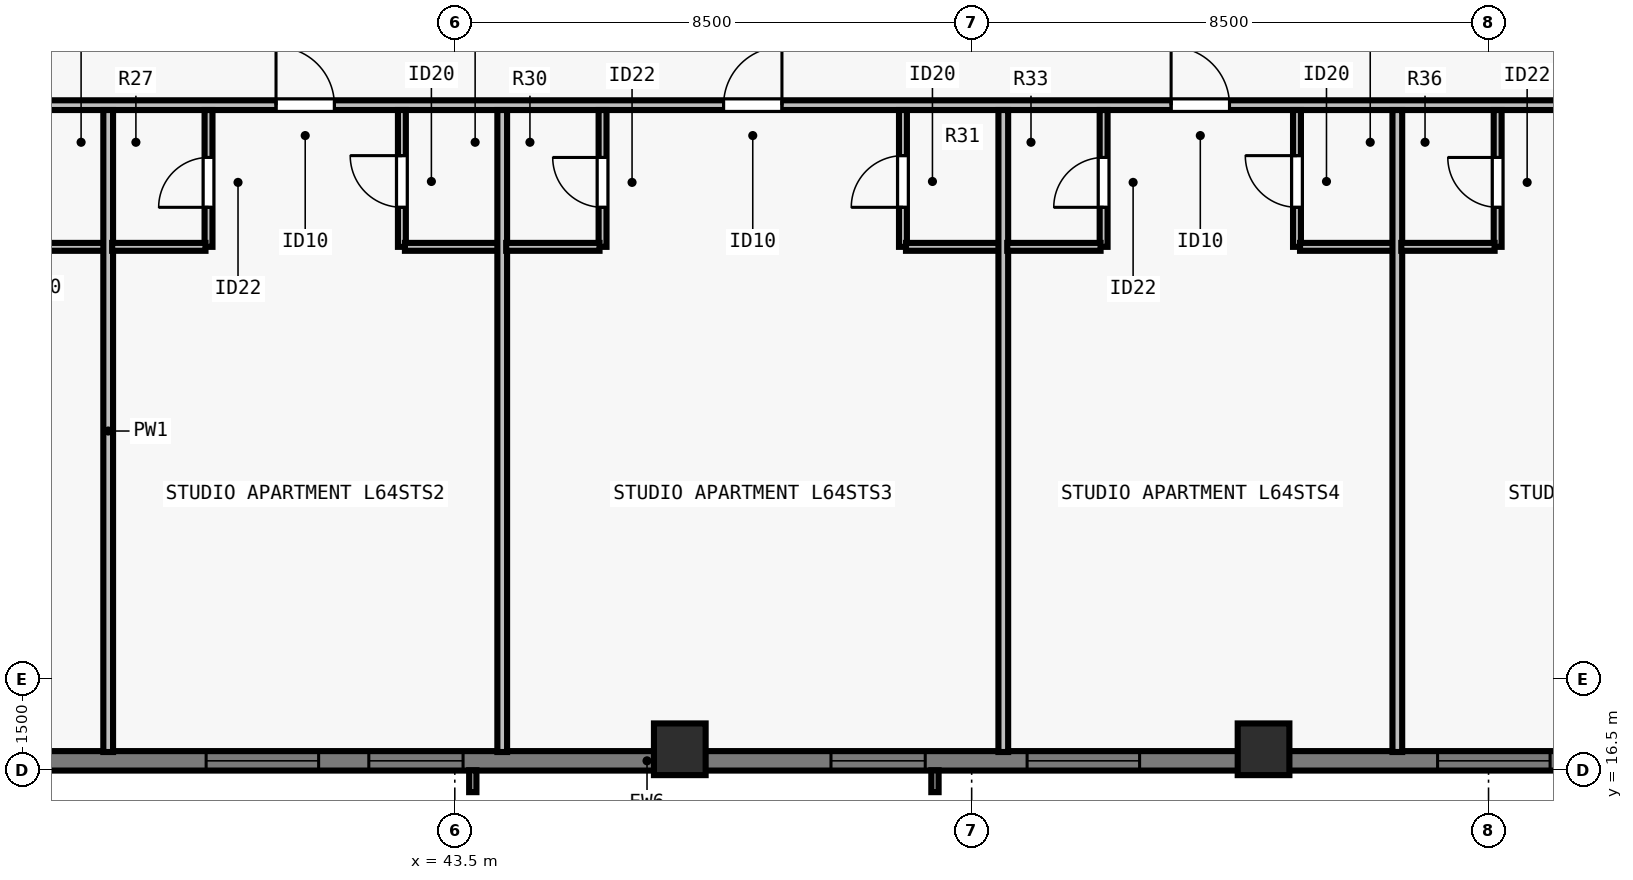
"""IFC4 building model, lengths in metres.
Left out: names, types, materials, properties, quantities, classifications, styles, units other than length and angle.
Written with IfcOpenShell. Run it as: python <this file> out.ifc"""

import sys

from ifc_helpers import new_model, si_unit, direction, frame, frame_2d, origin, origin_2d, place, context, subcontext, project, spatial, rectangle, extrude, element, fill, save


model = new_model("IFC4")
c1 = context("Model", 3, precision=1e-05, world=origin(), true_north=direction((0.0, 1.0)))
c2 = subcontext(c1, "Body", "Model", "MODEL_VIEW")
j1 = project(units=[si_unit("LENGTHUNIT", "METRE"), si_unit("PLANEANGLEUNIT", "RADIAN")], contexts=[c1])
p1 = place(None, origin())
s1 = spatial("IfcSite", under=j1, at=p1, CompositionType="ELEMENT")
p2 = place(p1, origin())
s2 = spatial("IfcBuilding", under=s1, at=p2, CompositionType="ELEMENT")
p3 = place(p2, frame((0.0, 0.0, 234.0)))
s3 = spatial("IfcBuildingStorey", under=s2, at=p3, CompositionType="ELEMENT", Elevation=234.0)
for number, where, z_axis, x_axis in (
    (1, (47.2, 16.85, 0.0), (0.0, 0.0, 1.0), (1.0, 0.0, 0.0)),
    (2, (56.8, 16.85, 0.0), (0.0, 0.0, 1.0), (1.0, 0.0, 0.0)),
):
    element("IfcColumn", number, at=place(p3, frame(where, z_axis=z_axis, x_axis=x_axis)), inside=s3, PredefinedType="COLUMN", context=c2, shape_type="SweptSolid", body=[
        extrude(rectangle(XDim=0.85, YDim=0.85, at=origin_2d()), origin(), (0.0, 0.0, 1.0), 3.5),
    ])
p4 = place(p3, frame((69.5, 16.66, 0.0), z_axis=(0.0, 0.0, 1.0), x_axis=(-1.0, 0.0, 0.0)))
e3 = element("IfcWall", 3, at=p4, inside=s3, PredefinedType="SOLIDWALL", context=c2, shape_type="SweptSolid", body=[
    extrude(rectangle(XDim=34.702, YDim=0.32, at=frame_2d((17.351, 0.0))), origin(), (0.0, 0.0, 1.0), 3.29),
])
p5 = place(p4, frame((4.763, 0.0, 0.8)))
e4 = element("IfcOpeningElement", 4, at=p5, cuts=e3, PredefinedType="OPENING", context=c2, shape_type="SweptSolid", body=[
    extrude(rectangle(XDim=1.55, YDim=1.678, at=frame_2d((0.775, 0.839))), frame((0.0, 0.17, 0.0), z_axis=(0.0, -1.0, 0.0), x_axis=(1.0, 0.0, 0.0)), (0.0, 0.0, 1.0), 0.34),
])
p6 = place(p4, frame((7.988, 0.0, 0.8)))
e5 = element("IfcOpeningElement", 5, at=p6, cuts=e3, PredefinedType="OPENING", context=c2, shape_type="SweptSolid", body=[
    extrude(rectangle(XDim=1.85, YDim=1.678, at=frame_2d((0.925, 0.839))), frame((0.0, 0.17, 0.0), z_axis=(0.0, -1.0, 0.0), x_axis=(1.0, 0.0, 0.0)), (0.0, 0.0, 1.0), 0.34),
])
p7 = place(p4, frame((14.738, 0.0, 0.8)))
e6 = element("IfcOpeningElement", 6, at=p7, cuts=e3, PredefinedType="OPENING", context=c2, shape_type="SweptSolid", body=[
    extrude(rectangle(XDim=1.85, YDim=1.678, at=frame_2d((0.925, 0.839))), frame((0.0, 0.17, 0.0), z_axis=(0.0, -1.0, 0.0), x_axis=(1.0, 0.0, 0.0)), (0.0, 0.0, 1.0), 0.34),
])
p8 = place(p4, frame((18.264, 0.0, 0.8)))
e7 = element("IfcOpeningElement", 7, at=p8, cuts=e3, PredefinedType="OPENING", context=c2, shape_type="SweptSolid", body=[
    extrude(rectangle(XDim=1.55, YDim=1.678, at=frame_2d((0.775, 0.839))), frame((0.0, 0.17, 0.0), z_axis=(0.0, -1.0, 0.0), x_axis=(1.0, 0.0, 0.0)), (0.0, 0.0, 1.0), 0.34),
])
p9 = place(p4, frame((25.864, 0.0, 0.8)))
e8 = element("IfcOpeningElement", 8, at=p9, cuts=e3, PredefinedType="OPENING", context=c2, shape_type="SweptSolid", body=[
    extrude(rectangle(XDim=1.55, YDim=1.678, at=frame_2d((0.775, 0.839))), frame((0.0, 0.17, 0.0), z_axis=(0.0, -1.0, 0.0), x_axis=(1.0, 0.0, 0.0)), (0.0, 0.0, 1.0), 0.34),
])
p10 = place(p4, frame((28.24, 0.0, 0.8)))
e9 = element("IfcOpeningElement", 9, at=p10, cuts=e3, PredefinedType="OPENING", context=c2, shape_type="SweptSolid", body=[
    extrude(rectangle(XDim=1.85, YDim=1.678, at=frame_2d((0.925, 0.839))), frame((0.0, 0.17, 0.0), z_axis=(0.0, -1.0, 0.0), x_axis=(1.0, 0.0, 0.0)), (0.0, 0.0, 1.0), 0.34),
])
p11 = place(p3, frame((29.805, 27.442, 0.0), z_axis=(0.0, 0.0, 1.0), x_axis=(1.0, 0.0, 0.0)))
e10 = element("IfcWall", 10, at=p11, inside=s3, PredefinedType="PARTITIONING", context=c2, shape_type="SweptSolid", body=[
    extrude(rectangle(XDim=44.39, YDim=0.16, at=frame_2d((22.195, 0.0))), origin(), (0.0, 0.0, 1.0), 2.958),
])
p12 = place(p11, frame((3.575, 0.0, 0.0)))
e11 = element("IfcOpeningElement", 11, at=p12, cuts=e10, PredefinedType="OPENING", context=c2, shape_type="SweptSolid", body=[
    extrude(rectangle(XDim=0.96, YDim=2.18, at=frame_2d((0.48, 1.09))), frame((0.0, 0.09, 0.0), z_axis=(0.0, -1.0, 0.0), x_axis=(1.0, 0.0, 0.0)), (0.0, 0.0, 1.0), 0.18),
])
p13 = place(p11, frame((10.755, 0.0, 0.0)))
e12 = element("IfcOpeningElement", 12, at=p13, cuts=e10, PredefinedType="OPENING", context=c2, shape_type="SweptSolid", body=[
    extrude(rectangle(XDim=0.96, YDim=2.18, at=frame_2d((0.48, 1.09))), frame((0.0, 0.09, 0.0), z_axis=(0.0, -1.0, 0.0), x_axis=(1.0, 0.0, 0.0)), (0.0, 0.0, 1.0), 0.18),
])
p14 = place(p11, frame((18.115, 0.0, 0.0)))
e13 = element("IfcOpeningElement", 13, at=p14, cuts=e10, PredefinedType="OPENING", context=c2, shape_type="SweptSolid", body=[
    extrude(rectangle(XDim=0.96, YDim=2.18, at=frame_2d((0.48, 1.09))), frame((0.0, 0.09, 0.0), z_axis=(0.0, -1.0, 0.0), x_axis=(1.0, 0.0, 0.0)), (0.0, 0.0, 1.0), 0.18),
])
p15 = place(p11, frame((25.475, 0.0, 0.0)))
e14 = element("IfcOpeningElement", 14, at=p15, cuts=e10, PredefinedType="OPENING", context=c2, shape_type="SweptSolid", body=[
    extrude(rectangle(XDim=0.96, YDim=2.18, at=frame_2d((0.48, 1.09))), frame((0.0, 0.09, 0.0), z_axis=(0.0, -1.0, 0.0), x_axis=(1.0, 0.0, 0.0)), (0.0, 0.0, 1.0), 0.18),
])
p16 = place(p11, frame((32.835, 0.0, 0.0)))
e15 = element("IfcOpeningElement", 15, at=p16, cuts=e10, PredefinedType="OPENING", context=c2, shape_type="SweptSolid", body=[
    extrude(rectangle(XDim=0.96, YDim=2.18, at=frame_2d((0.48, 1.09))), frame((0.0, 0.09, 0.0), z_axis=(0.0, -1.0, 0.0), x_axis=(1.0, 0.0, 0.0)), (0.0, 0.0, 1.0), 0.18),
])
p17 = place(p11, frame((40.375, 0.0, 0.0)))
e16 = element("IfcOpeningElement", 16, at=p17, cuts=e10, PredefinedType="OPENING", context=c2, shape_type="SweptSolid", body=[
    extrude(rectangle(XDim=0.96, YDim=2.18, at=frame_2d((0.48, 1.09))), frame((0.0, 0.09, 0.0), z_axis=(0.0, -1.0, 0.0), x_axis=(1.0, 0.0, 0.0)), (0.0, 0.0, 1.0), 0.18),
])
p18 = place(p3, frame((36.2, 25.113, 0.0), z_axis=(0.0, 0.0, 1.0), x_axis=(1.0, 0.0, 0.0)))
e17 = element("IfcWall", 17, at=p18, inside=s3, PredefinedType="PLUMBINGWALL", context=c2, shape_type="SweptSolid", body=[
    extrude(rectangle(XDim=1.6, YDim=0.13, at=frame_2d((0.8, 0.0))), origin(), (0.0, 0.0, 1.0), 3.29),
])
p19 = place(p3, frame((37.8, 16.805, 0.0), z_axis=(0.0, 0.0, 1.0), x_axis=(0.0, 1.0, 0.0)))
e18 = element("IfcWall", 18, at=p19, inside=s3, PredefinedType="PARTITIONING", context=c2, shape_type="SweptSolid", body=[
    extrude(rectangle(XDim=10.558, YDim=0.16, at=frame_2d((5.279, 0.0))), origin(), (0.0, 0.0, 1.0), 2.573),
])
p20 = place(p3, frame((39.45, 25.113, 0.0), z_axis=(0.0, 0.0, 1.0), x_axis=(0.0, 1.0, 0.0)))
e19 = element("IfcWall", 19, at=p20, inside=s3, PredefinedType="PLUMBINGWALL", context=c2, shape_type="SweptSolid", body=[
    extrude(rectangle(XDim=2.25, YDim=0.13, at=frame_2d((1.125, 0.0))), origin(), (0.0, 0.0, 1.0), 3.29),
])
p21 = place(p20, frame((0.65, 0.0, 0.0)))
e20 = element("IfcOpeningElement", 20, at=p21, cuts=e19, PredefinedType="OPENING", context=c2, shape_type="SweptSolid", body=[
    extrude(rectangle(XDim=0.82, YDim=2.1, at=frame_2d((0.41, 1.05))), frame((0.0, 0.075, 0.0), z_axis=(0.0, -1.0, 0.0), x_axis=(1.0, 0.0, 0.0)), (0.0, 0.0, 1.0), 0.15),
])
p22 = place(p3, frame((37.865, 25.113, 0.0), z_axis=(0.0, 0.0, 1.0), x_axis=(1.0, 0.0, 0.0)))
e21 = element("IfcWall", 21, at=p22, inside=s3, PredefinedType="PLUMBINGWALL", context=c2, shape_type="SweptSolid", body=[
    extrude(rectangle(XDim=1.535, YDim=0.13, at=frame_2d((0.768, 0.0))), origin(), (0.0, 0.0, 1.0), 3.29),
])
p23 = place(p3, frame((42.63, 25.113, 0.0), z_axis=(0.0, 0.0, 1.0), x_axis=(0.0, 1.0, 0.0)))
e22 = element("IfcWall", 22, at=p23, inside=s3, PredefinedType="PLUMBINGWALL", context=c2, shape_type="SweptSolid", body=[
    extrude(rectangle(XDim=2.25, YDim=0.13, at=frame_2d((1.125, 0.0))), origin(), (0.0, 0.0, 1.0), 3.29),
])
p24 = place(p23, frame((0.65, 0.0, 0.0)))
e23 = element("IfcOpeningElement", 23, at=p24, cuts=e22, PredefinedType="OPENING", context=c2, shape_type="SweptSolid", body=[
    extrude(rectangle(XDim=0.85, YDim=2.1, at=frame_2d((0.425, 1.05))), frame((0.0, 0.075, 0.0), z_axis=(0.0, -1.0, 0.0), x_axis=(1.0, 0.0, 0.0)), (0.0, 0.0, 1.0), 0.15),
])
p25 = place(p3, frame((42.68, 25.113, 0.0), z_axis=(0.0, 0.0, 1.0), x_axis=(1.0, 0.0, 0.0)))
e24 = element("IfcWall", 24, at=p25, inside=s3, PredefinedType="PLUMBINGWALL", context=c2, shape_type="SweptSolid", body=[
    extrude(rectangle(XDim=1.6, YDim=0.13, at=frame_2d((0.8, 0.0))), origin(), (0.0, 0.0, 1.0), 3.29),
])
p26 = place(p3, frame((44.28, 16.805, 0.0), z_axis=(0.0, 0.0, 1.0), x_axis=(0.0, 1.0, 0.0)))
e25 = element("IfcWall", 25, at=p26, inside=s3, PredefinedType="PARTITIONING", context=c2, shape_type="SweptSolid", body=[
    extrude(rectangle(XDim=10.558, YDim=0.16, at=frame_2d((5.279, 0.0))), origin(), (0.0, 0.0, 1.0), 3.29),
])
p27 = place(p3, frame((45.93, 25.113, 0.0), z_axis=(0.0, 0.0, 1.0), x_axis=(0.0, 1.0, 0.0)))
e26 = element("IfcWall", 26, at=p27, inside=s3, PredefinedType="PLUMBINGWALL", context=c2, shape_type="SweptSolid", body=[
    extrude(rectangle(XDim=2.25, YDim=0.13, at=frame_2d((1.125, 0.0))), origin(), (0.0, 0.0, 1.0), 3.29),
])
p28 = place(p27, frame((0.65, 0.0, 0.0)))
e27 = element("IfcOpeningElement", 27, at=p28, cuts=e26, PredefinedType="OPENING", context=c2, shape_type="SweptSolid", body=[
    extrude(rectangle(XDim=0.82, YDim=2.1, at=frame_2d((0.41, 1.05))), frame((0.0, 0.075, 0.0), z_axis=(0.0, -1.0, 0.0), x_axis=(1.0, 0.0, 0.0)), (0.0, 0.0, 1.0), 0.15),
])
p29 = place(p3, frame((44.345, 25.113, 0.0), z_axis=(0.0, 0.0, 1.0), x_axis=(1.0, 0.0, 0.0)))
e28 = element("IfcWall", 28, at=p29, inside=s3, PredefinedType="PLUMBINGWALL", context=c2, shape_type="SweptSolid", body=[
    extrude(rectangle(XDim=1.535, YDim=0.13, at=frame_2d((0.768, 0.0))), origin(), (0.0, 0.0, 1.0), 3.29),
])
p30 = place(p3, frame((50.87, 25.113, 0.0), z_axis=(0.0, 0.0, 1.0), x_axis=(0.0, 1.0, 0.0)))
e29 = element("IfcWall", 29, at=p30, inside=s3, PredefinedType="PLUMBINGWALL", context=c2, shape_type="SweptSolid", body=[
    extrude(rectangle(XDim=2.25, YDim=0.13, at=frame_2d((1.125, 0.0))), origin(), (0.0, 0.0, 1.0), 3.29),
])
p31 = place(p30, frame((0.65, 0.0, 0.0)))
e30 = element("IfcOpeningElement", 30, at=p31, cuts=e29, PredefinedType="OPENING", context=c2, shape_type="SweptSolid", body=[
    extrude(rectangle(XDim=0.85, YDim=2.1, at=frame_2d((0.425, 1.05))), frame((0.0, 0.075, 0.0), z_axis=(0.0, -1.0, 0.0), x_axis=(1.0, 0.0, 0.0)), (0.0, 0.0, 1.0), 0.15),
])
p32 = place(p3, frame((50.92, 25.113, 0.0), z_axis=(0.0, 0.0, 1.0), x_axis=(1.0, 0.0, 0.0)))
e31 = element("IfcWall", 31, at=p32, inside=s3, PredefinedType="PLUMBINGWALL", context=c2, shape_type="SweptSolid", body=[
    extrude(rectangle(XDim=1.6, YDim=0.13, at=frame_2d((0.8, 0.0))), origin(), (0.0, 0.0, 1.0), 3.29),
])
p33 = place(p3, frame((52.52, 16.805, 0.0), z_axis=(0.0, 0.0, 1.0), x_axis=(0.0, 1.0, 0.0)))
e32 = element("IfcWall", 32, at=p33, inside=s3, PredefinedType="PARTITIONING", context=c2, shape_type="SweptSolid", body=[
    extrude(rectangle(XDim=10.558, YDim=0.16, at=frame_2d((5.279, 0.0))), origin(), (0.0, 0.0, 1.0), 2.958),
])
p34 = place(p3, frame((54.17, 25.113, 0.0), z_axis=(0.0, 0.0, 1.0), x_axis=(0.0, 1.0, 0.0)))
e33 = element("IfcWall", 33, at=p34, inside=s3, PredefinedType="PLUMBINGWALL", context=c2, shape_type="SweptSolid", body=[
    extrude(rectangle(XDim=2.25, YDim=0.13, at=frame_2d((1.125, 0.0))), origin(), (0.0, 0.0, 1.0), 2.958),
])
p35 = place(p34, frame((0.65, 0.0, 0.0)))
e34 = element("IfcOpeningElement", 34, at=p35, cuts=e33, PredefinedType="OPENING", context=c2, shape_type="SweptSolid", body=[
    extrude(rectangle(XDim=0.82, YDim=2.1, at=frame_2d((0.41, 1.05))), frame((0.0, 0.075, 0.0), z_axis=(0.0, -1.0, 0.0), x_axis=(1.0, 0.0, 0.0)), (0.0, 0.0, 1.0), 0.15),
])
p36 = place(p3, frame((52.585, 25.113, 0.0), z_axis=(0.0, 0.0, 1.0), x_axis=(1.0, 0.0, 0.0)))
e35 = element("IfcWall", 35, at=p36, inside=s3, PredefinedType="PLUMBINGWALL", context=c2, shape_type="SweptSolid", body=[
    extrude(rectangle(XDim=1.535, YDim=0.13, at=frame_2d((0.768, 0.0))), origin(), (0.0, 0.0, 1.0), 3.29),
])
p37 = place(p3, frame((57.35, 25.113, 0.0), z_axis=(0.0, 0.0, 1.0), x_axis=(0.0, 1.0, 0.0)))
e36 = element("IfcWall", 36, at=p37, inside=s3, PredefinedType="PLUMBINGWALL", context=c2, shape_type="SweptSolid", body=[
    extrude(rectangle(XDim=2.25, YDim=0.13, at=frame_2d((1.125, 0.0))), origin(), (0.0, 0.0, 1.0), 3.29),
])
p38 = place(p37, frame((0.65, 0.0, 0.0)))
e37 = element("IfcOpeningElement", 37, at=p38, cuts=e36, PredefinedType="OPENING", context=c2, shape_type="SweptSolid", body=[
    extrude(rectangle(XDim=0.85, YDim=2.1, at=frame_2d((0.425, 1.05))), frame((0.0, 0.075, 0.0), z_axis=(0.0, -1.0, 0.0), x_axis=(1.0, 0.0, 0.0)), (0.0, 0.0, 1.0), 0.15),
])
p39 = place(p3, frame((57.4, 25.113, 0.0), z_axis=(0.0, 0.0, 1.0), x_axis=(1.0, 0.0, 0.0)))
e38 = element("IfcWall", 38, at=p39, inside=s3, PredefinedType="PLUMBINGWALL", context=c2, shape_type="SweptSolid", body=[
    extrude(rectangle(XDim=1.6, YDim=0.13, at=frame_2d((0.8, 0.0))), origin(), (0.0, 0.0, 1.0), 3.29),
])
p40 = place(p3, frame((59.0, 16.805, 0.0), z_axis=(0.0, 0.0, 1.0), x_axis=(0.0, 1.0, 0.0)))
e39 = element("IfcWall", 39, at=p40, inside=s3, PredefinedType="PARTITIONING", context=c2, shape_type="SweptSolid", body=[
    extrude(rectangle(XDim=10.558, YDim=0.16, at=frame_2d((5.279, 0.0))), origin(), (0.0, 0.0, 1.0), 3.29),
])
p41 = place(p3, frame((60.65, 25.113, 0.0), z_axis=(0.0, 0.0, 1.0), x_axis=(0.0, 1.0, 0.0)))
e40 = element("IfcWall", 40, at=p41, inside=s3, PredefinedType="PLUMBINGWALL", context=c2, shape_type="SweptSolid", body=[
    extrude(rectangle(XDim=2.25, YDim=0.13, at=frame_2d((1.125, 0.0))), origin(), (0.0, 0.0, 1.0), 3.29),
])
p42 = place(p41, frame((0.65, 0.0, 0.0)))
e41 = element("IfcOpeningElement", 41, at=p42, cuts=e40, PredefinedType="OPENING", context=c2, shape_type="SweptSolid", body=[
    extrude(rectangle(XDim=0.82, YDim=2.1, at=frame_2d((0.41, 1.05))), frame((0.0, 0.075, 0.0), z_axis=(0.0, -1.0, 0.0), x_axis=(1.0, 0.0, 0.0)), (0.0, 0.0, 1.0), 0.15),
])
p43 = place(p3, frame((59.065, 25.113, 0.0), z_axis=(0.0, 0.0, 1.0), x_axis=(1.0, 0.0, 0.0)))
e42 = element("IfcWall", 42, at=p43, inside=s3, PredefinedType="PLUMBINGWALL", context=c2, shape_type="SweptSolid", body=[
    extrude(rectangle(XDim=1.535, YDim=0.13, at=frame_2d((0.768, 0.0))), origin(), (0.0, 0.0, 1.0), 3.29),
])
p44 = place(p6, origin())
e43 = element("IfcWindow", 43, at=p44, inside=s3, PartitioningType="SINGLE_PANEL", PredefinedType="WINDOW", context=c2, shape_type="SweptSolid", body=[
    extrude(rectangle(XDim=1.85, YDim=1.678, at=frame_2d((0.925, 0.839))), frame((0.0, -0.05, 0.0), z_axis=(0.0, -1.0, 0.0), x_axis=(1.0, 0.0, 0.0)), (0.0, 0.0, 1.0), 0.06),
])
fill(e5, e43)
p45 = place(p7, origin())
e44 = element("IfcWindow", 44, at=p45, inside=s3, PartitioningType="SINGLE_PANEL", PredefinedType="WINDOW", context=c2, shape_type="SweptSolid", body=[
    extrude(rectangle(XDim=1.85, YDim=1.678, at=frame_2d((0.925, 0.839))), frame((0.0, -0.05, 0.0), z_axis=(0.0, -1.0, 0.0), x_axis=(1.0, 0.0, 0.0)), (0.0, 0.0, 1.0), 0.06),
])
fill(e6, e44)
p46 = place(p8, origin())
e45 = element("IfcWindow", 45, at=p46, inside=s3, PartitioningType="SINGLE_PANEL", PredefinedType="WINDOW", context=c2, shape_type="SweptSolid", body=[
    extrude(rectangle(XDim=1.55, YDim=1.678, at=frame_2d((0.775, 0.839))), frame((0.0, -0.05, 0.0), z_axis=(0.0, -1.0, 0.0), x_axis=(1.0, 0.0, 0.0)), (0.0, 0.0, 1.0), 0.06),
])
fill(e7, e45)
p47 = place(p9, origin())
e46 = element("IfcWindow", 46, at=p47, inside=s3, PartitioningType="SINGLE_PANEL", PredefinedType="WINDOW", context=c2, shape_type="SweptSolid", body=[
    extrude(rectangle(XDim=1.55, YDim=1.678, at=frame_2d((0.775, 0.839))), frame((0.0, -0.05, 0.0), z_axis=(0.0, -1.0, 0.0), x_axis=(1.0, 0.0, 0.0)), (0.0, 0.0, 1.0), 0.06),
])
fill(e8, e46)
p48 = place(p10, origin())
e47 = element("IfcWindow", 47, at=p48, inside=s3, PartitioningType="SINGLE_PANEL", PredefinedType="WINDOW", context=c2, shape_type="SweptSolid", body=[
    extrude(rectangle(XDim=1.85, YDim=1.678, at=frame_2d((0.925, 0.839))), frame((0.0, -0.05, 0.0), z_axis=(0.0, -1.0, 0.0), x_axis=(1.0, 0.0, 0.0)), (0.0, 0.0, 1.0), 0.06),
])
fill(e9, e47)
p49 = place(p21, origin())
e48 = element("IfcDoor", 48, at=p49, inside=s3, OperationType="SINGLE_SWING_LEFT", PredefinedType="DOOR", context=c2, shape_type="SweptSolid", body=[
    extrude(rectangle(XDim=0.82, YDim=2.1, at=frame_2d((0.41, 1.05))), frame((0.0, 0.025, 0.0), z_axis=(0.0, -1.0, 0.0), x_axis=(1.0, 0.0, 0.0)), (0.0, 0.0, 1.0), 0.05),
])
fill(e20, e48)
p50 = place(p24, origin())
e49 = element("IfcDoor", 49, at=p50, inside=s3, OperationType="SINGLE_SWING_RIGHT", PredefinedType="DOOR", context=c2, shape_type="SweptSolid", body=[
    extrude(rectangle(XDim=0.85, YDim=2.1, at=frame_2d((0.425, 1.05))), frame((0.0, 0.025, 0.0), z_axis=(0.0, -1.0, 0.0), x_axis=(1.0, 0.0, 0.0)), (0.0, 0.0, 1.0), 0.05),
])
fill(e23, e49)
p51 = place(p13, origin())
e50 = element("IfcDoor", 50, at=p51, inside=s3, OperationType="SINGLE_SWING_LEFT", PredefinedType="DOOR", context=c2, shape_type="SweptSolid", body=[
    extrude(rectangle(XDim=0.96, YDim=2.18, at=frame_2d((0.48, 1.09))), frame((0.0, 0.025, 0.0), z_axis=(0.0, -1.0, 0.0), x_axis=(1.0, 0.0, 0.0)), (0.0, 0.0, 1.0), 0.05),
])
fill(e12, e50)
p52 = place(p28, origin())
e51 = element("IfcDoor", 51, at=p52, inside=s3, OperationType="SINGLE_SWING_RIGHT", PredefinedType="DOOR", context=c2, shape_type="SweptSolid", body=[
    extrude(rectangle(XDim=0.82, YDim=2.1, at=frame_2d((0.41, 1.05))), frame((0.0, 0.025, 0.0), z_axis=(0.0, -1.0, 0.0), x_axis=(1.0, 0.0, 0.0)), (0.0, 0.0, 1.0), 0.05),
])
fill(e27, e51)
p53 = place(p31, origin())
e52 = element("IfcDoor", 52, at=p53, inside=s3, OperationType="SINGLE_SWING_LEFT", PredefinedType="DOOR", context=c2, shape_type="SweptSolid", body=[
    extrude(rectangle(XDim=0.85, YDim=2.1, at=frame_2d((0.425, 1.05))), frame((0.0, 0.025, 0.0), z_axis=(0.0, -1.0, 0.0), x_axis=(1.0, 0.0, 0.0)), (0.0, 0.0, 1.0), 0.05),
])
fill(e30, e52)
p54 = place(p14, origin())
e53 = element("IfcDoor", 53, at=p54, inside=s3, OperationType="SINGLE_SWING_RIGHT", PredefinedType="DOOR", context=c2, shape_type="SweptSolid", body=[
    extrude(rectangle(XDim=0.96, YDim=2.18, at=frame_2d((0.48, 1.09))), frame((0.0, 0.025, 0.0), z_axis=(0.0, -1.0, 0.0), x_axis=(1.0, 0.0, 0.0)), (0.0, 0.0, 1.0), 0.05),
])
fill(e13, e53)
p55 = place(p35, origin())
e54 = element("IfcDoor", 54, at=p55, inside=s3, OperationType="SINGLE_SWING_LEFT", PredefinedType="DOOR", context=c2, shape_type="SweptSolid", body=[
    extrude(rectangle(XDim=0.82, YDim=2.1, at=frame_2d((0.41, 1.05))), frame((0.0, 0.025, 0.0), z_axis=(0.0, -1.0, 0.0), x_axis=(1.0, 0.0, 0.0)), (0.0, 0.0, 1.0), 0.05),
])
fill(e34, e54)
p56 = place(p38, origin())
e55 = element("IfcDoor", 55, at=p56, inside=s3, OperationType="SINGLE_SWING_RIGHT", PredefinedType="DOOR", context=c2, shape_type="SweptSolid", body=[
    extrude(rectangle(XDim=0.85, YDim=2.1, at=frame_2d((0.425, 1.05))), frame((0.0, 0.025, 0.0), z_axis=(0.0, -1.0, 0.0), x_axis=(1.0, 0.0, 0.0)), (0.0, 0.0, 1.0), 0.05),
])
fill(e37, e55)
p57 = place(p15, origin())
e56 = element("IfcDoor", 56, at=p57, inside=s3, OperationType="SINGLE_SWING_LEFT", PredefinedType="DOOR", context=c2, shape_type="SweptSolid", body=[
    extrude(rectangle(XDim=0.96, YDim=2.18, at=frame_2d((0.48, 1.09))), frame((0.0, 0.025, 0.0), z_axis=(0.0, -1.0, 0.0), x_axis=(1.0, 0.0, 0.0)), (0.0, 0.0, 1.0), 0.05),
])
fill(e14, e56)
p58 = place(p42, origin())
e57 = element("IfcDoor", 57, at=p58, inside=s3, OperationType="SINGLE_SWING_RIGHT", PredefinedType="DOOR", context=c2, shape_type="SweptSolid", body=[
    extrude(rectangle(XDim=0.82, YDim=2.1, at=frame_2d((0.41, 1.05))), frame((0.0, 0.025, 0.0), z_axis=(0.0, -1.0, 0.0), x_axis=(1.0, 0.0, 0.0)), (0.0, 0.0, 1.0), 0.05),
])
fill(e41, e57)
save(model, sys.argv[1])
